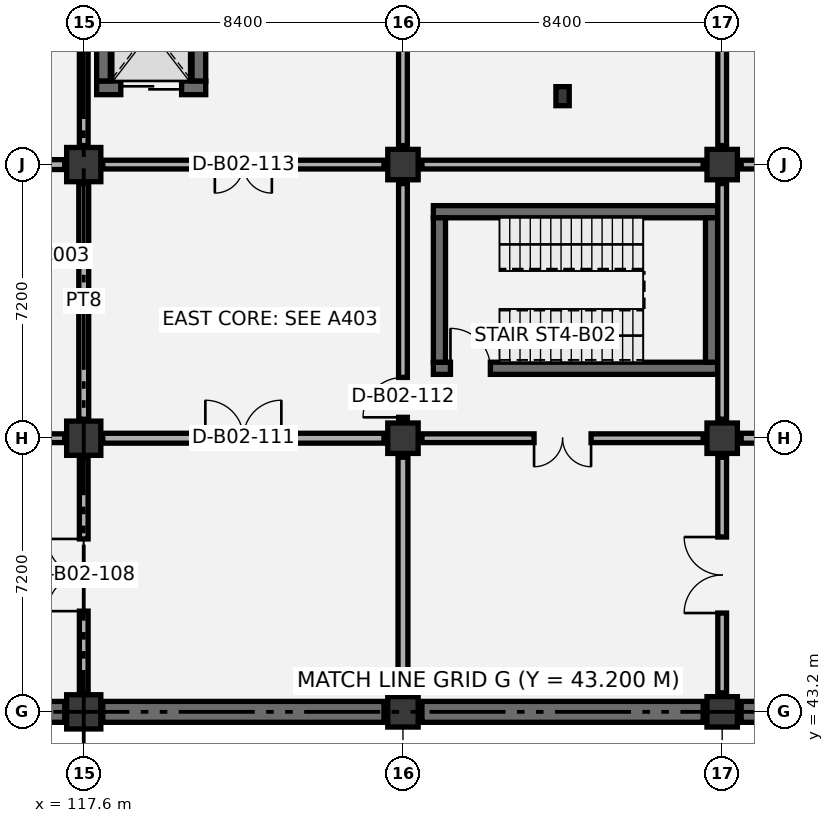
"""IFC4 building model, lengths in metres.
Left out: names, types, materials, properties, quantities, classifications, styles, units other than length and angle.
Written with IfcOpenShell. Run it as: python <this file> out.ifc"""

import sys

from ifc_helpers import new_model, si_unit, direction, frame, frame_2d, origin, origin_2d, place, context, subcontext, project, spatial, rectangle, extrude, element, fill, save


model = new_model("IFC4")
c1 = context("Model", 3, precision=1e-05, world=origin(), true_north=direction((0.0, 1.0)))
c2 = subcontext(c1, "Body", "Model", "MODEL_VIEW")
j1 = project(units=[si_unit("LENGTHUNIT", "METRE"), si_unit("PLANEANGLEUNIT", "RADIAN")], contexts=[c1])
p1 = place(None, origin())
s1 = spatial("IfcSite", under=j1, at=p1, CompositionType="ELEMENT")
p2 = place(p1, origin())
s2 = spatial("IfcBuilding", under=s1, at=p2, CompositionType="ELEMENT")
p3 = place(p2, frame((0.0, 0.0, -9.6)))
s3 = spatial("IfcBuildingStorey", under=s2, at=p3, CompositionType="ELEMENT", Elevation=-9.6)
for number, where, z_axis, x_axis in (
    (1, (117.6, 43.2, 0.0), (0.0, 0.0, 1.0), (1.0, 0.0, 0.0)),
    (2, (117.6, 50.4, 0.0), (0.0, 0.0, 1.0), (1.0, 0.0, 0.0)),
    (3, (117.6, 57.6, 0.0), (0.0, 0.0, 1.0), (1.0, 0.0, 0.0)),
):
    element("IfcColumn", number, at=place(p3, frame(where, z_axis=z_axis, x_axis=x_axis)), inside=s3, PredefinedType="COLUMN", context=c2, shape_type="SweptSolid", body=[
        extrude(rectangle(XDim=0.9, YDim=0.9, at=origin_2d()), origin(), (0.0, 0.0, 1.0), 4.8),
    ])
for number, where, z_axis, x_axis in (
    (4, (126.0, 43.2, 0.0), (0.0, 0.0, 1.0), (1.0, 0.0, 0.0)),
    (5, (126.0, 50.4, 0.0), (0.0, 0.0, 1.0), (1.0, 0.0, 0.0)),
    (6, (126.0, 57.6, 0.0), (0.0, 0.0, 1.0), (1.0, 0.0, 0.0)),
    (7, (134.4, 43.2, 0.0), (0.0, 0.0, 1.0), (1.0, 0.0, 0.0)),
    (8, (134.4, 50.4, 0.0), (0.0, 0.0, 1.0), (1.0, 0.0, 0.0)),
    (9, (134.4, 57.6, 0.0), (0.0, 0.0, 1.0), (1.0, 0.0, 0.0)),
):
    element("IfcColumn", number, at=place(p3, frame(where, z_axis=z_axis, x_axis=x_axis)), inside=s3, PredefinedType="COLUMN", context=c2, shape_type="SweptSolid", body=[
        extrude(rectangle(XDim=0.8, YDim=0.8, at=origin_2d()), origin(), (0.0, 0.0, 1.0), 4.8),
    ])
p4 = place(p3, frame((130.2, 59.4, 0.0), z_axis=(0.0, 0.0, 1.0), x_axis=(1.0, 0.0, 0.0)))
e10 = element("IfcColumn", 10, at=p4, inside=s3, PredefinedType="PILASTER", context=c2, shape_type="SweptSolid", body=[
    extrude(rectangle(XDim=0.35, YDim=0.5, at=origin_2d()), origin(), (0.0, 0.0, 1.0), 4.8),
])
p5 = place(p3, frame((109.7, 43.2, 0.0), z_axis=(0.0, 0.0, 1.0), x_axis=(1.0, 0.0, 0.0)))
e11 = element("IfcWall", 11, at=p5, inside=s3, PredefinedType="USERDEFINED", context=c2, shape_type="SweptSolid", body=[
    extrude(rectangle(XDim=7.4, YDim=0.55, at=frame_2d((3.7, 0.0))), origin(), (0.0, 0.0, 1.0), 4.4),
])
for number, where, z_axis, x_axis in (
    (12, (118.1, 43.2, 0.0), (0.0, 0.0, 1.0), (1.0, 0.0, 0.0)),
    (13, (126.5, 43.2, 0.0), (0.0, 0.0, 1.0), (1.0, 0.0, 0.0)),
):
    element("IfcWall", number, at=place(p3, frame(where, z_axis=z_axis, x_axis=x_axis)), inside=s3, PredefinedType="USERDEFINED", context=c2, shape_type="SweptSolid", body=[
        extrude(rectangle(XDim=7.4, YDim=0.55, at=frame_2d((3.7, 0.0))), origin(), (0.0, 0.0, 1.0), 4.4),
    ])
p6 = place(p3, frame((134.9, 43.2, 0.0), z_axis=(0.0, 0.0, 1.0), x_axis=(1.0, 0.0, 0.0)))
e14 = element("IfcWall", 14, at=p6, inside=s3, PredefinedType="USERDEFINED", context=c2, shape_type="SweptSolid", body=[
    extrude(rectangle(XDim=7.4, YDim=0.55, at=frame_2d((3.7, 0.0))), origin(), (0.0, 0.0, 1.0), 4.4),
])
p7 = place(p3, frame((126.8, 52.24, 0.0), z_axis=(0.0, 0.0, 1.0), x_axis=(1.0, 0.0, 0.0)))
e15 = element("IfcWall", 15, at=p7, inside=s3, PredefinedType="SHEAR", context=c2, shape_type="SweptSolid", body=[
    extrude(rectangle(XDim=7.48, YDim=0.32, at=frame_2d((3.74, 0.0))), origin(), (0.0, 0.0, 1.0), 4.4),
])
p8 = place(p7, frame((0.45, 0.0, 0.0)))
e16 = element("IfcOpeningElement", 16, at=p8, cuts=e15, PredefinedType="OPENING", context=c2, shape_type="SweptSolid", body=[
    extrude(rectangle(XDim=1.05, YDim=2.15, at=frame_2d((0.525, 1.075))), frame((0.0, 0.17, 0.0), z_axis=(0.0, -1.0, 0.0), x_axis=(1.0, 0.0, 0.0)), (0.0, 0.0, 1.0), 0.34),
])
p9 = place(p3, frame((126.8, 56.36, 0.0), z_axis=(0.0, 0.0, 1.0), x_axis=(1.0, 0.0, 0.0)))
e17 = element("IfcWall", 17, at=p9, inside=s3, PredefinedType="SHEAR", context=c2, shape_type="SweptSolid", body=[
    extrude(rectangle(XDim=7.48, YDim=0.32, at=frame_2d((3.74, 0.0))), origin(), (0.0, 0.0, 1.0), 4.4),
])
for number, where, z_axis, x_axis in (
    (18, (126.96, 52.4, 0.0), (0.0, 0.0, 1.0), (0.0, 1.0, 0.0)),
    (19, (134.12, 52.4, 0.0), (0.0, 0.0, 1.0), (0.0, 1.0, 0.0)),
):
    element("IfcWall", number, at=place(p3, frame(where, z_axis=z_axis, x_axis=x_axis)), inside=s3, PredefinedType="SHEAR", context=c2, shape_type="SweptSolid", body=[
        extrude(rectangle(XDim=3.8, YDim=0.32, at=frame_2d((1.9, 0.0))), origin(), (0.0, 0.0, 1.0), 4.4),
    ])
p10 = place(p3, frame((117.94, 59.62, -0.75), z_axis=(0.0, 0.0, 1.0), x_axis=(1.0, 0.0, 0.0)))
e20 = element("IfcWall", 20, at=p10, inside=s3, PredefinedType="SHEAR", context=c2, shape_type="SweptSolid", body=[
    extrude(rectangle(XDim=2.87, YDim=0.36, at=frame_2d((1.435, 0.0))), origin(), (0.0, 0.0, 1.0), 5.15),
])
p11 = place(p10, frame((0.635, 0.0, 0.75)))
e21 = element("IfcOpeningElement", 21, at=p11, cuts=e20, PredefinedType="OPENING", context=c2, shape_type="SweptSolid", body=[
    extrude(rectangle(XDim=1.6, YDim=2.25, at=frame_2d((0.8, 1.125))), frame((0.0, 0.19, 0.0), z_axis=(0.0, -1.0, 0.0), x_axis=(1.0, 0.0, 0.0)), (0.0, 0.0, 1.0), 0.38),
])
for number, where, z_axis, x_axis in (
    (22, (118.12, 59.8, -0.75), (0.0, 0.0, 1.0), (0.0, 1.0, 0.0)),
    (23, (120.63, 59.8, -0.75), (0.0, 0.0, 1.0), (0.0, 1.0, 0.0)),
):
    element("IfcWall", number, at=place(p3, frame(where, z_axis=z_axis, x_axis=x_axis)), inside=s3, PredefinedType="SHEAR", context=c2, shape_type="SweptSolid", body=[
        extrude(rectangle(XDim=2.8, YDim=0.36, at=frame_2d((1.4, 0.0))), origin(), (0.0, 0.0, 1.0), 5.15),
    ])
p12 = place(p3, frame((109.35, 55.2, 0.0), z_axis=(0.0, 0.0, 1.0), x_axis=(1.0, 0.0, 0.0)))
e24 = element("IfcWall", 24, at=p12, inside=s3, PredefinedType="PARTITIONING", context=c2, shape_type="SweptSolid", body=[
    extrude(rectangle(XDim=8.1, YDim=0.12, at=frame_2d((4.05, 0.0))), origin(), (0.0, 0.0, 1.0), 4.4),
])
p13 = place(p12, frame((1.08, 0.0, 0.0)))
e25 = element("IfcOpeningElement", 25, at=p13, cuts=e24, PredefinedType="OPENING", context=c2, shape_type="SweptSolid", body=[
    extrude(rectangle(XDim=0.95, YDim=2.1, at=frame_2d((0.475, 1.05))), frame((0.0, 0.07, 0.0), z_axis=(0.0, -1.0, 0.0), x_axis=(1.0, 0.0, 0.0)), (0.0, 0.0, 1.0), 0.14),
])
p14 = place(p12, frame((3.63, 0.0, 0.0)))
e26 = element("IfcOpeningElement", 26, at=p14, cuts=e24, PredefinedType="OPENING", context=c2, shape_type="SweptSolid", body=[
    extrude(rectangle(XDim=0.9, YDim=2.1, at=frame_2d((0.45, 1.05))), frame((0.0, 0.07, 0.0), z_axis=(0.0, -1.0, 0.0), x_axis=(1.0, 0.0, 0.0)), (0.0, 0.0, 1.0), 0.14),
])
p15 = place(p12, frame((6.13, 0.0, 0.0)))
e27 = element("IfcOpeningElement", 27, at=p15, cuts=e24, PredefinedType="OPENING", context=c2, shape_type="SweptSolid", body=[
    extrude(rectangle(XDim=1.0, YDim=2.1, at=frame_2d((0.5, 1.05))), frame((0.0, 0.07, 0.0), z_axis=(0.0, -1.0, 0.0), x_axis=(1.0, 0.0, 0.0)), (0.0, 0.0, 1.0), 0.14),
])
p16 = place(p3, frame((117.6, 43.7, 0.0), z_axis=(0.0, 0.0, 1.0), x_axis=(0.0, 1.0, 0.0)))
e28 = element("IfcWall", 28, at=p16, inside=s3, PredefinedType="PARTITIONING", context=c2, shape_type="SweptSolid", body=[
    extrude(rectangle(XDim=6.2, YDim=0.23, at=frame_2d((3.1, 0.0))), origin(), (0.0, 0.0, 1.0), 3.595),
])
p17 = place(p16, frame((2.15, 0.0, 0.0)))
e29 = element("IfcOpeningElement", 29, at=p17, cuts=e28, PredefinedType="OPENING", context=c2, shape_type="SweptSolid", body=[
    extrude(rectangle(XDim=1.9, YDim=2.3, at=frame_2d((0.95, 1.15))), frame((0.0, 0.125, 0.0), z_axis=(0.0, -1.0, 0.0), x_axis=(1.0, 0.0, 0.0)), (0.0, 0.0, 1.0), 0.25),
])
p18 = place(p3, frame((109.7, 50.4, 0.0), z_axis=(0.0, 0.0, 1.0), x_axis=(1.0, 0.0, 0.0)))
e30 = element("IfcWall", 30, at=p18, inside=s3, PredefinedType="PARTITIONING", context=c2, shape_type="SweptSolid", body=[
    extrude(rectangle(XDim=7.4, YDim=0.23, at=frame_2d((3.7, 0.0))), origin(), (0.0, 0.0, 1.0), 3.495),
])
p19 = place(p3, frame((117.6, 50.9, 0.0), z_axis=(0.0, 0.0, 1.0), x_axis=(0.0, 1.0, 0.0)))
e31 = element("IfcWall", 31, at=p19, inside=s3, PredefinedType="PARTITIONING", context=c2, shape_type="SweptSolid", body=[
    extrude(rectangle(XDim=6.2, YDim=0.26, at=frame_2d((3.1, 0.0))), origin(), (0.0, 0.0, 1.0), 3.595),
])
p20 = place(p3, frame((109.7, 57.6, 0.0), z_axis=(0.0, 0.0, 1.0), x_axis=(1.0, 0.0, 0.0)))
e32 = element("IfcWall", 32, at=p20, inside=s3, PredefinedType="PARTITIONING", context=c2, shape_type="SweptSolid", body=[
    extrude(rectangle(XDim=7.4, YDim=0.26, at=frame_2d((3.7, 0.0))), origin(), (0.0, 0.0, 1.0), 3.495),
])
p21 = place(p20, frame((2.7, 0.0, 0.0)))
e33 = element("IfcOpeningElement", 33, at=p21, cuts=e32, PredefinedType="OPENING", context=c2, shape_type="SweptSolid", body=[
    extrude(rectangle(XDim=2.0, YDim=2.35, at=frame_2d((1.0, 1.175))), frame((0.0, 0.14, 0.0), z_axis=(0.0, -1.0, 0.0), x_axis=(1.0, 0.0, 0.0)), (0.0, 0.0, 1.0), 0.28),
])
p22 = place(p3, frame((117.6, 58.1, 0.0), z_axis=(0.0, 0.0, 1.0), x_axis=(0.0, 1.0, 0.0)))
e34 = element("IfcWall", 34, at=p22, inside=s3, PredefinedType="PARTITIONING", context=c2, shape_type="SweptSolid", body=[
    extrude(rectangle(XDim=6.2, YDim=0.23, at=frame_2d((3.1, 0.0))), origin(), (0.0, 0.0, 1.0), 3.595),
])
p23 = place(p3, frame((126.0, 43.7, 0.0), z_axis=(0.0, 0.0, 1.0), x_axis=(0.0, 1.0, 0.0)))
e35 = element("IfcWall", 35, at=p23, inside=s3, PredefinedType="PARTITIONING", context=c2, shape_type="SweptSolid", body=[
    extrude(rectangle(XDim=6.2, YDim=0.26, at=frame_2d((3.1, 0.0))), origin(), (0.0, 0.0, 1.0), 3.595),
])
p24 = place(p3, frame((118.1, 50.4, 0.0), z_axis=(0.0, 0.0, 1.0), x_axis=(1.0, 0.0, 0.0)))
e36 = element("IfcWall", 36, at=p24, inside=s3, PredefinedType="PARTITIONING", context=c2, shape_type="SweptSolid", body=[
    extrude(rectangle(XDim=7.4, YDim=0.26, at=frame_2d((3.7, 0.0))), origin(), (0.0, 0.0, 1.0), 3.495),
])
p25 = place(p24, frame((2.7, 0.0, 0.0)))
e37 = element("IfcOpeningElement", 37, at=p25, cuts=e36, PredefinedType="OPENING", context=c2, shape_type="SweptSolid", body=[
    extrude(rectangle(XDim=2.0, YDim=2.35, at=frame_2d((1.0, 1.175))), frame((0.0, 0.14, 0.0), z_axis=(0.0, -1.0, 0.0), x_axis=(1.0, 0.0, 0.0)), (0.0, 0.0, 1.0), 0.28),
])
p26 = place(p3, frame((126.0, 50.9, 0.0), z_axis=(0.0, 0.0, 1.0), x_axis=(0.0, 1.0, 0.0)))
e38 = element("IfcWall", 38, at=p26, inside=s3, PredefinedType="PARTITIONING", context=c2, shape_type="SweptSolid", body=[
    extrude(rectangle(XDim=6.2, YDim=0.23, at=frame_2d((3.1, 0.0))), origin(), (0.0, 0.0, 1.0), 3.595),
])
p27 = place(p26, frame((0.05, 0.0, 0.0)))
e39 = element("IfcOpeningElement", 39, at=p27, cuts=e38, PredefinedType="OPENING", context=c2, shape_type="SweptSolid", body=[
    extrude(rectangle(XDim=1.05, YDim=2.15, at=frame_2d((0.525, 1.075))), frame((0.0, 0.125, 0.0), z_axis=(0.0, -1.0, 0.0), x_axis=(1.0, 0.0, 0.0)), (0.0, 0.0, 1.0), 0.25),
])
p28 = place(p3, frame((118.1, 57.6, 0.0), z_axis=(0.0, 0.0, 1.0), x_axis=(1.0, 0.0, 0.0)))
e40 = element("IfcWall", 40, at=p28, inside=s3, PredefinedType="PARTITIONING", context=c2, shape_type="SweptSolid", body=[
    extrude(rectangle(XDim=7.4, YDim=0.23, at=frame_2d((3.7, 0.0))), origin(), (0.0, 0.0, 1.0), 3.495),
])
p29 = place(p28, frame((2.95, 0.0, 0.0)))
e41 = element("IfcOpeningElement", 41, at=p29, cuts=e40, PredefinedType="OPENING", context=c2, shape_type="SweptSolid", body=[
    extrude(rectangle(XDim=1.5, YDim=2.15, at=frame_2d((0.75, 1.075))), frame((0.0, 0.125, 0.0), z_axis=(0.0, -1.0, 0.0), x_axis=(1.0, 0.0, 0.0)), (0.0, 0.0, 1.0), 0.25),
])
p30 = place(p3, frame((126.0, 58.1, 0.0), z_axis=(0.0, 0.0, 1.0), x_axis=(0.0, 1.0, 0.0)))
e42 = element("IfcWall", 42, at=p30, inside=s3, PredefinedType="PARTITIONING", context=c2, shape_type="SweptSolid", body=[
    extrude(rectangle(XDim=6.2, YDim=0.23, at=frame_2d((3.1, 0.0))), origin(), (0.0, 0.0, 1.0), 3.595),
])
p31 = place(p3, frame((134.4, 43.7, 0.0), z_axis=(0.0, 0.0, 1.0), x_axis=(0.0, 1.0, 0.0)))
e43 = element("IfcWall", 43, at=p31, inside=s3, PredefinedType="PARTITIONING", context=c2, shape_type="SweptSolid", body=[
    extrude(rectangle(XDim=6.2, YDim=0.23, at=frame_2d((3.1, 0.0))), origin(), (0.0, 0.0, 1.0), 3.595),
])
p32 = place(p31, frame((2.1, 0.0, 0.0)))
e44 = element("IfcOpeningElement", 44, at=p32, cuts=e43, PredefinedType="OPENING", context=c2, shape_type="SweptSolid", body=[
    extrude(rectangle(XDim=2.0, YDim=2.35, at=frame_2d((1.0, 1.175))), frame((0.0, 0.125, 0.0), z_axis=(0.0, -1.0, 0.0), x_axis=(1.0, 0.0, 0.0)), (0.0, 0.0, 1.0), 0.25),
])
p33 = place(p3, frame((126.5, 50.4, 0.0), z_axis=(0.0, 0.0, 1.0), x_axis=(1.0, 0.0, 0.0)))
e45 = element("IfcWall", 45, at=p33, inside=s3, PredefinedType="PARTITIONING", context=c2, shape_type="SweptSolid", body=[
    extrude(rectangle(XDim=7.4, YDim=0.23, at=frame_2d((3.7, 0.0))), origin(), (0.0, 0.0, 1.0), 3.495),
])
p34 = place(p33, frame((2.95, 0.0, 0.0)))
e46 = element("IfcOpeningElement", 46, at=p34, cuts=e45, PredefinedType="OPENING", context=c2, shape_type="SweptSolid", body=[
    extrude(rectangle(XDim=1.5, YDim=2.15, at=frame_2d((0.75, 1.075))), frame((0.0, 0.125, 0.0), z_axis=(0.0, -1.0, 0.0), x_axis=(1.0, 0.0, 0.0)), (0.0, 0.0, 1.0), 0.25),
])
p35 = place(p3, frame((134.4, 50.9, 0.0), z_axis=(0.0, 0.0, 1.0), x_axis=(0.0, 1.0, 0.0)))
e47 = element("IfcWall", 47, at=p35, inside=s3, PredefinedType="PARTITIONING", context=c2, shape_type="SweptSolid", body=[
    extrude(rectangle(XDim=6.2, YDim=0.23, at=frame_2d((3.1, 0.0))), origin(), (0.0, 0.0, 1.0), 3.595),
])
p36 = place(p3, frame((126.5, 57.6, 0.0), z_axis=(0.0, 0.0, 1.0), x_axis=(1.0, 0.0, 0.0)))
e48 = element("IfcWall", 48, at=p36, inside=s3, PredefinedType="PARTITIONING", context=c2, shape_type="SweptSolid", body=[
    extrude(rectangle(XDim=7.4, YDim=0.23, at=frame_2d((3.7, 0.0))), origin(), (0.0, 0.0, 1.0), 3.495),
])
p37 = place(p3, frame((134.4, 58.1, 0.0), z_axis=(0.0, 0.0, 1.0), x_axis=(0.0, 1.0, 0.0)))
e49 = element("IfcWall", 49, at=p37, inside=s3, PredefinedType="PARTITIONING", context=c2, shape_type="SweptSolid", body=[
    extrude(rectangle(XDim=6.2, YDim=0.23, at=frame_2d((3.1, 0.0))), origin(), (0.0, 0.0, 1.0), 3.595),
])
p38 = place(p3, frame((134.9, 50.4, 0.0), z_axis=(0.0, 0.0, 1.0), x_axis=(1.0, 0.0, 0.0)))
e50 = element("IfcWall", 50, at=p38, inside=s3, PredefinedType="PARTITIONING", context=c2, shape_type="SweptSolid", body=[
    extrude(rectangle(XDim=7.4, YDim=0.26, at=frame_2d((3.7, 0.0))), origin(), (0.0, 0.0, 1.0), 3.495),
])
p39 = place(p3, frame((134.9, 57.6, 0.0), z_axis=(0.0, 0.0, 1.0), x_axis=(1.0, 0.0, 0.0)))
e51 = element("IfcWall", 51, at=p39, inside=s3, PredefinedType="PARTITIONING", context=c2, shape_type="SweptSolid", body=[
    extrude(rectangle(XDim=7.4, YDim=0.23, at=frame_2d((3.7, 0.0))), origin(), (0.0, 0.0, 1.0), 3.495),
])
p40 = place(p39, frame((2.7, 0.0, 0.0)))
e52 = element("IfcOpeningElement", 52, at=p40, cuts=e51, PredefinedType="OPENING", context=c2, shape_type="SweptSolid", body=[
    extrude(rectangle(XDim=2.0, YDim=2.35, at=frame_2d((1.0, 1.175))), frame((0.0, 0.125, 0.0), z_axis=(0.0, -1.0, 0.0), x_axis=(1.0, 0.0, 0.0)), (0.0, 0.0, 1.0), 0.25),
])
p41 = place(p8, origin())
e53 = element("IfcDoor", 53, at=p41, inside=s3, OperationType="SINGLE_SWING_LEFT", PredefinedType="DOOR", context=c2, shape_type="SweptSolid", body=[
    extrude(rectangle(XDim=1.05, YDim=2.15, at=frame_2d((0.525, 1.075))), frame((0.0, 0.025, 0.0), z_axis=(0.0, -1.0, 0.0), x_axis=(1.0, 0.0, 0.0)), (0.0, 0.0, 1.0), 0.05),
])
fill(e16, e53)
p42 = place(p11, origin())
e54 = element("IfcDoor", 54, at=p42, inside=s3, OperationType="DOUBLE_DOOR_SLIDING", PredefinedType="DOOR", context=c2, shape_type="SweptSolid", body=[
    extrude(rectangle(XDim=1.6, YDim=2.25, at=frame_2d((0.8, 1.125))), frame((0.0, 0.025, 0.0), z_axis=(0.0, -1.0, 0.0), x_axis=(1.0, 0.0, 0.0)), (0.0, 0.0, 1.0), 0.05),
])
fill(e21, e54)
p43 = place(p17, origin())
e55 = element("IfcDoor", 55, at=p43, inside=s3, OperationType="DOUBLE_DOOR_SINGLE_SWING", PredefinedType="DOOR", context=c2, shape_type="SweptSolid", body=[
    extrude(rectangle(XDim=1.9, YDim=2.3, at=frame_2d((0.95, 1.15))), frame((0.0, 0.025, 0.0), z_axis=(0.0, -1.0, 0.0), x_axis=(1.0, 0.0, 0.0)), (0.0, 0.0, 1.0), 0.05),
])
fill(e29, e55)
p44 = place(p25, origin())
e56 = element("IfcDoor", 56, at=p44, inside=s3, OperationType="DOUBLE_DOOR_SINGLE_SWING", PredefinedType="DOOR", context=c2, shape_type="SweptSolid", body=[
    extrude(rectangle(XDim=2.0, YDim=2.35, at=frame_2d((1.0, 1.175))), frame((0.0, 0.025, 0.0), z_axis=(0.0, -1.0, 0.0), x_axis=(1.0, 0.0, 0.0)), (0.0, 0.0, 1.0), 0.05),
])
fill(e37, e56)
p45 = place(p27, origin())
e57 = element("IfcDoor", 57, at=p45, inside=s3, OperationType="SINGLE_SWING_LEFT", PredefinedType="DOOR", context=c2, shape_type="SweptSolid", body=[
    extrude(rectangle(XDim=1.05, YDim=2.15, at=frame_2d((0.525, 1.075))), frame((0.0, 0.025, 0.0), z_axis=(0.0, -1.0, 0.0), x_axis=(1.0, 0.0, 0.0)), (0.0, 0.0, 1.0), 0.05),
])
fill(e39, e57)
p46 = place(p29, frame((1.5, 0.0, 0.0), z_axis=(0.0, 0.0, 1.0), x_axis=(-1.0, 0.0, 0.0)))
e58 = element("IfcDoor", 58, at=p46, inside=s3, OperationType="DOUBLE_DOOR_SINGLE_SWING", PredefinedType="DOOR", context=c2, shape_type="SweptSolid", body=[
    extrude(rectangle(XDim=1.5, YDim=2.15, at=frame_2d((0.75, 1.075))), frame((0.0, 0.025, 0.0), z_axis=(0.0, -1.0, 0.0), x_axis=(1.0, 0.0, 0.0)), (0.0, 0.0, 1.0), 0.05),
])
fill(e41, e58)
p47 = place(p32, origin())
e59 = element("IfcDoor", 59, at=p47, inside=s3, OperationType="DOUBLE_DOOR_SINGLE_SWING", PredefinedType="DOOR", context=c2, shape_type="SweptSolid", body=[
    extrude(rectangle(XDim=2.0, YDim=2.35, at=frame_2d((1.0, 1.175))), frame((0.0, 0.025, 0.0), z_axis=(0.0, -1.0, 0.0), x_axis=(1.0, 0.0, 0.0)), (0.0, 0.0, 1.0), 0.05),
])
fill(e44, e59)
p48 = place(p34, frame((1.5, 0.0, 0.0), z_axis=(0.0, 0.0, 1.0), x_axis=(-1.0, 0.0, 0.0)))
e60 = element("IfcDoor", 60, at=p48, inside=s3, OperationType="DOUBLE_DOOR_SINGLE_SWING", PredefinedType="DOOR", context=c2, shape_type="SweptSolid", body=[
    extrude(rectangle(XDim=1.5, YDim=2.15, at=frame_2d((0.75, 1.075))), frame((0.0, 0.025, 0.0), z_axis=(0.0, -1.0, 0.0), x_axis=(1.0, 0.0, 0.0)), (0.0, 0.0, 1.0), 0.05),
])
fill(e46, e60)
save(model, sys.argv[1])
